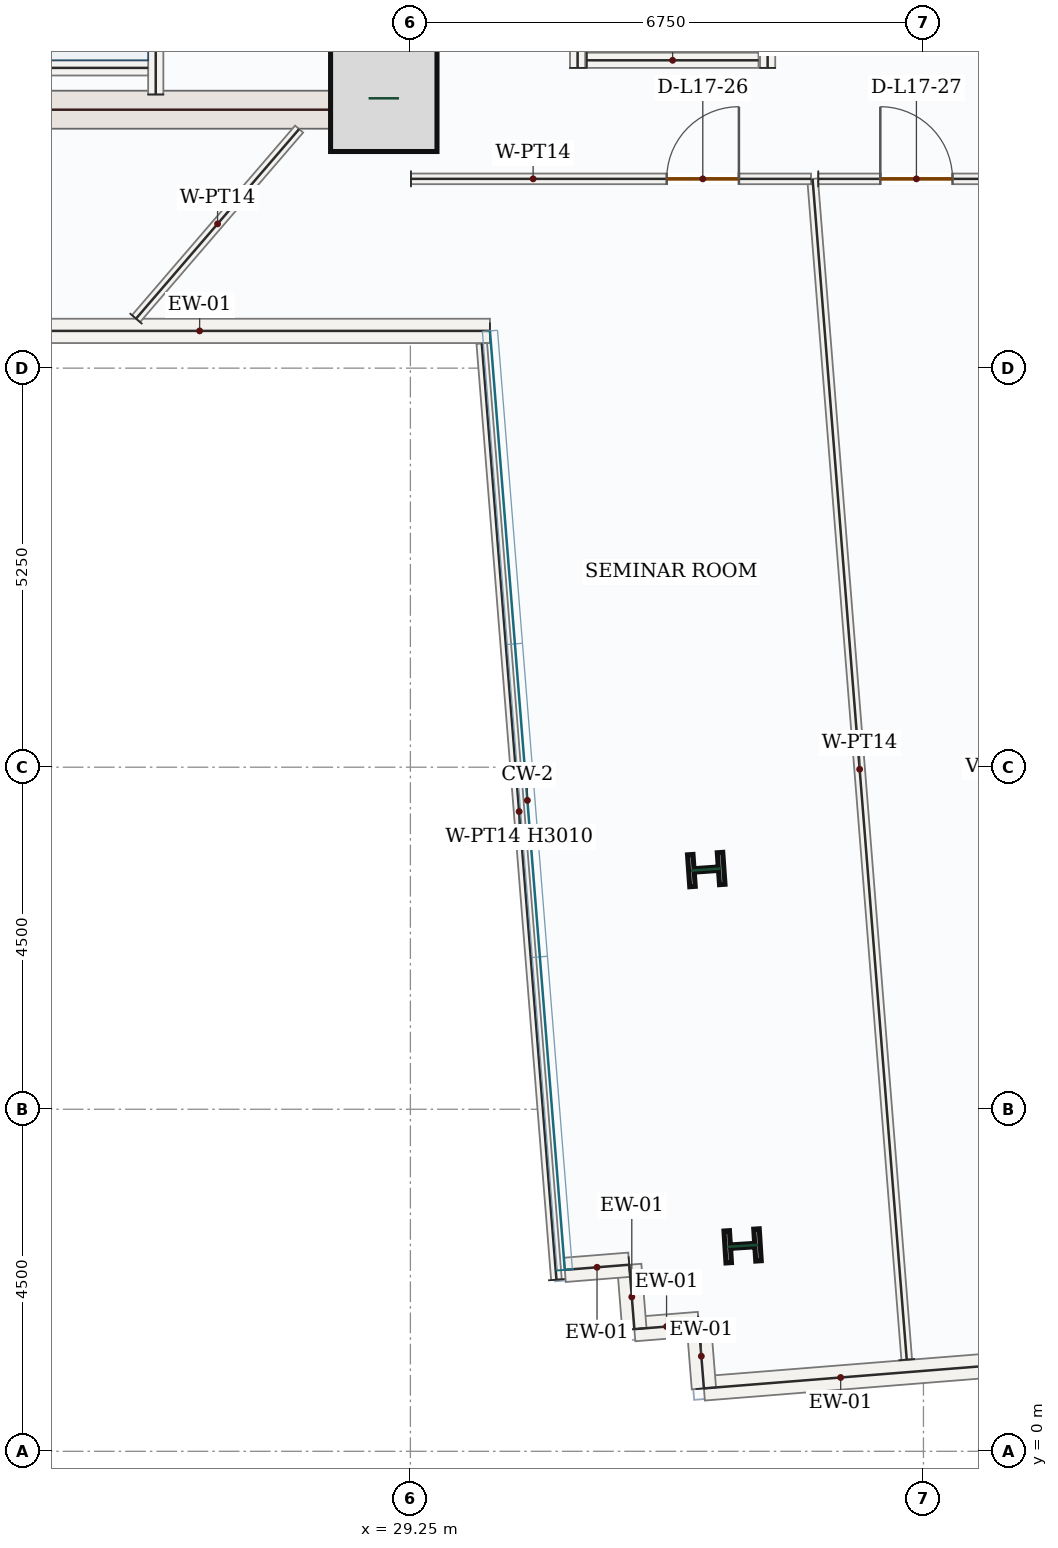
"""IFC4 building model, lengths in metres.
Left out: names, types, materials, properties, quantities, classifications, styles, units other than length and angle.
Written with IfcOpenShell. Run it as: python <this file> out.ifc"""

import sys

from ifc_helpers import new_model, si_unit, direction, frame, frame_2d, origin, origin_2d, place, context, subcontext, project, spatial, rectangle, i_section, extrude, source, transform, mapped, element, fill, save


model = new_model("IFC4")
c1 = context("Model", 3, precision=1e-05, world=origin(), true_north=direction((0.0, 1.0)))
c2 = subcontext(c1, "Body", "Model", "MODEL_VIEW")
j1 = project(units=[si_unit("LENGTHUNIT", "METRE"), si_unit("PLANEANGLEUNIT", "RADIAN")], contexts=[c1])
p1 = place(None, origin())
s1 = spatial("IfcSite", under=j1, at=p1, CompositionType="ELEMENT")
p2 = place(p1, origin())
s2 = spatial("IfcBuilding", under=s1, at=p2, CompositionType="ELEMENT")
p3 = place(p2, frame((0.0, 0.0, 79.5)))
s3 = spatial("IfcBuildingStorey", under=s2, at=p3, CompositionType="ELEMENT", Elevation=79.5)
p4 = place(p3, frame((29.0, 17.4, 0.0), z_axis=(0.0, 0.0, 1.0), x_axis=(0.0, 1.0, 0.0)))
e1 = element("IfcWall", 1, at=p4, inside=s3, PredefinedType="SHEAR", context=c2, shape_type="SweptSolid", body=[
    extrude(rectangle(XDim=8.55, YDim=0.5, at=frame_2d((4.275, 0.0))), origin(), (0.0, 0.0, 1.0), 3.95),
])
p5 = place(p4, frame((6.65, 0.0, 0.0)))
e2 = element("IfcOpeningElement", 2, at=p5, cuts=e1, PredefinedType="OPENING", context=c2, shape_type="SweptSolid", body=[
    extrude(rectangle(XDim=1.1, YDim=2.2, at=frame_2d((0.55, 1.1))), frame((0.0, 0.26, 0.0), z_axis=(0.0, -1.0, 0.0), x_axis=(1.0, 0.0, 0.0)), (0.0, 0.0, 1.0), 0.52),
])
p6 = place(p4, frame((2.15, 0.0, 0.0)))
e3 = element("IfcOpeningElement", 3, at=p6, cuts=e1, PredefinedType="OPENING", context=c2, shape_type="SweptSolid", body=[
    extrude(rectangle(XDim=0.88, YDim=2.1, at=frame_2d((0.44, 1.05))), frame((0.0, 0.26, 0.0), z_axis=(0.0, -1.0, 0.0), x_axis=(1.0, 0.0, 0.0)), (0.0, 0.0, 1.0), 0.52),
])
p7 = place(p4, frame((4.25, 0.0, 0.0)))
e4 = element("IfcOpeningElement", 4, at=p7, cuts=e1, PredefinedType="OPENING", context=c2, shape_type="SweptSolid", body=[
    extrude(rectangle(XDim=0.88, YDim=2.1, at=frame_2d((0.44, 1.05))), frame((0.0, 0.26, 0.0), z_axis=(0.0, -1.0, 0.0), x_axis=(1.0, 0.0, 0.0)), (0.0, 0.0, 1.0), 0.52),
])
m1 = source(origin(), c2, "Body", "SweptSolid", [
    extrude(rectangle(XDim=7.0, YDim=0.5, at=frame_2d((3.5, 0.0))), origin(), (0.0, 0.0, 1.0), 3.95),
])
p8 = place(p3, frame((21.75, 17.65, 0.0), z_axis=(0.0, 0.0, 1.0), x_axis=(1.0, 0.0, 0.0)))
e5 = element("IfcWall", 5, at=p8, inside=s3, PredefinedType="SHEAR", context=c2, shape_type="MappedRepresentation", body=[
    mapped(m1, transform((0.0, 0.0, 0.0), x_axis=(1.0, 0.0, 0.0), y_axis=(0.0, 1.0, 0.0), z_axis=(0.0, 0.0, 1.0), scale=1.0)),
])
m2 = source(origin(), c2, "Body", "SweptSolid", [
    extrude(rectangle(XDim=1.4, YDim=1.4, at=origin_2d()), origin(), (0.0, 0.0, 1.0), 4.2),
])
p9 = place(p3, frame((28.9, 17.8, 0.0), z_axis=(0.0, 0.0, 1.0), x_axis=(1.0, 0.0, 0.0)))
e6 = element("IfcColumn", 6, at=p9, inside=s3, PredefinedType="COLUMN", context=c2, shape_type="MappedRepresentation", body=[
    mapped(m2, transform((0.0, 0.0, 0.0), x_axis=(1.0, 0.0, 0.0), y_axis=(0.0, 1.0, 0.0), z_axis=(0.0, 0.0, 1.0), scale=1.0)),
])
m3 = source(origin(), c2, "Body", "SweptSolid", [
    extrude(i_section(OverallWidth=0.421, OverallDepth=0.465, WebThickness=0.045, FlangeThickness=0.073, FilletRadius=0.018, at=origin_2d()), origin(), (0.0, 0.0, 1.0), 4.2),
])
for number, where, z_axis, x_axis in (
    (7, (33.143, 7.654, 0.0), (0.0, 0.0, 1.0), (-0.07, 0.998, 0.0)),
    (8, (33.621, 2.703, 0.0), (0.0, 0.0, 1.0), (-0.063, 0.998, 0.0)),
):
    element("IfcColumn", number, at=place(p3, frame(where, z_axis=z_axis, x_axis=x_axis)), inside=s3, PredefinedType="COLUMN", context=c2, shape_type="MappedRepresentation", body=[
        mapped(m3, transform((0.0, 0.0, 0.0), x_axis=(1.0, 0.0, 0.0), y_axis=(0.0, 1.0, 0.0), z_axis=(0.0, 0.0, 1.0), scale=1.0)),
    ])
p10 = place(p3, frame((43.0, 1.616, 0.0), z_axis=(0.0, 0.0, 1.0), x_axis=(-0.996833485558, -0.079517306731, 0.0)))
e9 = element("IfcWall", 9, at=p10, inside=s3, PredefinedType="SOLIDWALL", context=c2, shape_type="SweptSolid", body=[
    extrude(rectangle(XDim=9.92, YDim=0.32, at=frame_2d((4.96, 0.0))), origin(), (0.0, 0.0, 1.0), 3.95),
])
p11 = place(p10, frame((3.76, 0.0, 0.85)))
e10 = element("IfcOpeningElement", 10, at=p11, cuts=e9, PredefinedType="OPENING", context=c2, shape_type="SweptSolid", body=[
    extrude(rectangle(XDim=2.4, YDim=1.8, at=frame_2d((1.2, 0.9))), frame((0.0, 0.17, 0.0), z_axis=(0.0, -1.0, 0.0), x_axis=(1.0, 0.0, 0.0)), (0.0, 0.0, 1.0), 0.34),
])
m4 = source(origin(), c2, "Body", "SweptSolid", [
    extrude(rectangle(XDim=0.85, YDim=0.32, at=frame_2d((0.425, 0.0))), origin(), (0.0, 0.0, 1.0), 3.95),
])
p12 = place(p3, frame((33.112, 0.827, 0.0), z_axis=(0.0, 0.0, 1.0), x_axis=(-0.079551174585, 0.996830783344, 0.0)))
e11 = element("IfcWall", 11, at=p12, inside=s3, PredefinedType="SOLIDWALL", context=c2, shape_type="MappedRepresentation", body=[
    mapped(m4, transform((0.0, 0.0, 0.0), x_axis=(1.0, 0.0, 0.0), y_axis=(0.0, 1.0, 0.0), z_axis=(0.0, 0.0, 1.0), scale=1.0)),
])
m5 = source(origin(), c2, "Body", "SweptSolid", [
    extrude(rectangle(XDim=0.85, YDim=0.32, at=frame_2d((0.425, 0.0))), origin(), (0.0, 0.0, 1.0), 3.95),
])
for number, where, z_axis, x_axis in (
    (12, (33.044, 1.675, 0.0), (0.0, 0.0, 1.0), (-0.997, -0.079, 0.0)),
    (13, (32.197, 1.607, 0.0), (0.0, 0.0, 1.0), (-0.08, 0.997, 0.0)),
):
    element("IfcWall", number, at=place(p3, frame(where, z_axis=z_axis, x_axis=x_axis)), inside=s3, PredefinedType="SOLIDWALL", context=c2, shape_type="MappedRepresentation", body=[
        mapped(m5, transform((0.0, 0.0, 0.0), x_axis=(1.0, 0.0, 0.0), y_axis=(0.0, 1.0, 0.0), z_axis=(0.0, 0.0, 1.0), scale=1.0)),
    ])
p13 = place(p3, frame((32.129, 2.455, 0.0), z_axis=(0.0, 0.0, 1.0), x_axis=(-0.996830783344, -0.079551174585, 0.0)))
e14 = element("IfcWall", 14, at=p13, inside=s3, PredefinedType="SOLIDWALL", context=c2, shape_type="MappedRepresentation", body=[
    mapped(m4, transform((0.0, 0.0, 0.0), x_axis=(1.0, 0.0, 0.0), y_axis=(0.0, 1.0, 0.0), z_axis=(0.0, 0.0, 1.0), scale=1.0)),
])
m6 = source(origin(), c2, "Body", "SweptSolid", [
    extrude(rectangle(XDim=7.639, YDim=0.32, at=frame_2d((3.819, 0.0))), origin(), (0.0, 0.0, 1.0), 3.95),
])
p14 = place(p3, frame((30.297, 14.74, 0.0), z_axis=(0.0, 0.0, 1.0), x_axis=(-1.0, 0.0, 0.0)))
e15 = element("IfcWall", 15, at=p14, inside=s3, PredefinedType="SOLIDWALL", context=c2, shape_type="MappedRepresentation", body=[
    mapped(m6, transform((0.0, 0.0, 0.0), x_axis=(1.0, 0.0, 0.0), y_axis=(0.0, 1.0, 0.0), z_axis=(0.0, 0.0, 1.0), scale=1.0)),
])
p15 = place(p3, frame((25.9, 17.85, 0.0), z_axis=(0.0, 0.0, 1.0), x_axis=(0.0, 1.0, 0.0)))
e16 = element("IfcWall", 16, at=p15, inside=s3, PredefinedType="SOLIDWALL", context=c2, shape_type="SweptSolid", body=[
    extrude(rectangle(XDim=8.0, YDim=0.2, at=frame_2d((4.0, 0.0))), origin(), (0.0, 0.0, 1.0), 3.95),
])
p16 = place(p15, frame((6.3, 0.0, 0.0)))
e17 = element("IfcOpeningElement", 17, at=p16, cuts=e16, PredefinedType="OPENING", context=c2, shape_type="SweptSolid", body=[
    extrude(rectangle(XDim=1.05, YDim=2.15, at=frame_2d((0.525, 1.075))), frame((0.0, 0.11, 0.0), z_axis=(0.0, -1.0, 0.0), x_axis=(1.0, 0.0, 0.0)), (0.0, 0.0, 1.0), 0.22),
])
m7 = source(origin(), c2, "Body", "SweptSolid", [
    extrude(rectangle(XDim=3.25, YDim=0.2, at=frame_2d((1.625, 0.0))), origin(), (0.0, 0.0, 1.0), 3.95),
])
p17 = place(p3, frame((22.55, 18.2, 0.0), z_axis=(0.0, 0.0, 1.0), x_axis=(1.0, 0.0, 0.0)))
e18 = element("IfcWall", 18, at=p17, inside=s3, PredefinedType="SOLIDWALL", context=c2, shape_type="MappedRepresentation", body=[
    mapped(m7, transform((0.0, 0.0, 0.0), x_axis=(1.0, 0.0, 0.0), y_axis=(0.0, 1.0, 0.0), z_axis=(0.0, 0.0, 1.0), scale=1.0)),
])
m8 = source(origin(), c2, "Body", "SweptSolid", [
    extrude(rectangle(XDim=2.35, YDim=0.2, at=frame_2d((1.175, 0.0))), origin(), (0.0, 0.0, 1.0), 3.95),
])
for number, where, z_axis, x_axis in (
    (19, (31.45, 18.2, 0.0), (0.0, 0.0, 1.0), (0.0, 1.0, 0.0)),
    (20, (33.95, 18.2, 0.0), (0.0, 0.0, 1.0), (0.0, 1.0, 0.0)),
):
    element("IfcWall", number, at=place(p3, frame(where, z_axis=z_axis, x_axis=x_axis)), inside=s3, PredefinedType="SOLIDWALL", context=c2, shape_type="MappedRepresentation", body=[
        mapped(m8, transform((0.0, 0.0, 0.0), x_axis=(1.0, 0.0, 0.0), y_axis=(0.0, 1.0, 0.0), z_axis=(0.0, 0.0, 1.0), scale=1.0)),
    ])
m9 = source(origin(), c2, "Body", "SweptSolid", [
    extrude(rectangle(XDim=2.26, YDim=0.2, at=frame_2d((1.13, 0.0))), origin(), (0.0, 0.0, 1.0), 3.95),
])
p18 = place(p3, frame((31.57, 18.3, 0.0), z_axis=(0.0, 0.0, 1.0), x_axis=(1.0, 0.0, 0.0)))
e21 = element("IfcWall", 21, at=p18, inside=s3, PredefinedType="SOLIDWALL", context=c2, shape_type="MappedRepresentation", body=[
    mapped(m9, transform((0.0, 0.0, 0.0), x_axis=(1.0, 0.0, 0.0), y_axis=(0.0, 1.0, 0.0), z_axis=(0.0, 0.0, 1.0), scale=1.0)),
])
m10 = source(origin(), c2, "Body", "SweptSolid", [
    extrude(rectangle(XDim=15.583, YDim=0.14, at=frame_2d((7.792, 0.0))), origin(), (0.0, 0.0, 1.0), 3.95),
])
p19 = place(p3, frame((35.78, 1.206, 0.0), z_axis=(0.0, 0.0, 1.0), x_axis=(-0.079507979427, 0.996834229552, 0.0)))
e22 = element("IfcWall", 22, at=p19, inside=s3, PredefinedType="PARTITIONING", context=c2, shape_type="MappedRepresentation", body=[
    mapped(m10, transform((0.0, 0.0, 0.0), x_axis=(1.0, 0.0, 0.0), y_axis=(0.0, 1.0, 0.0), z_axis=(0.0, 0.0, 1.0), scale=1.0)),
])
p20 = place(p3, frame((34.616, 16.74, 0.0), z_axis=(0.0, 0.0, 1.0), x_axis=(1.0, 0.0, 0.0)))
e23 = element("IfcWall", 23, at=p20, inside=s3, PredefinedType="PARTITIONING", context=c2, shape_type="SweptSolid", body=[
    extrude(rectangle(XDim=4.66, YDim=0.14, at=frame_2d((2.33, 0.0))), origin(), (0.0, 0.0, 1.0), 3.95),
])
p21 = place(p20, frame((0.816, 0.0, 0.0)))
e24 = element("IfcOpeningElement", 24, at=p21, cuts=e23, PredefinedType="OPENING", context=c2, shape_type="SweptSolid", body=[
    extrude(rectangle(XDim=0.95, YDim=2.15, at=frame_2d((0.475, 1.075))), frame((0.0, 0.08, 0.0), z_axis=(0.0, -1.0, 0.0), x_axis=(1.0, 0.0, 0.0)), (0.0, 0.0, 1.0), 0.16),
])
p22 = place(p3, frame((29.258, 16.74, 0.0), z_axis=(0.0, 0.0, 1.0), x_axis=(0.999999998924, -4.6384341e-05, 0.0)))
e25 = element("IfcWall", 25, at=p22, inside=s3, PredefinedType="PARTITIONING", context=c2, shape_type="SweptSolid", body=[
    extrude(rectangle(XDim=5.263, YDim=0.14, at=frame_2d((2.632, 0.0))), origin(), (0.0, 0.0, 1.0), 3.95),
])
p23 = place(p22, frame((3.365, 0.0, 0.0)))
e26 = element("IfcOpeningElement", 26, at=p23, cuts=e25, PredefinedType="OPENING", context=c2, shape_type="SweptSolid", body=[
    extrude(rectangle(XDim=0.95, YDim=2.15, at=frame_2d((0.475, 1.075))), frame((0.0, 0.08, 0.0), z_axis=(0.0, -1.0, 0.0), x_axis=(1.0, 0.0, 0.0)), (0.0, 0.0, 1.0), 0.16),
])
m11 = source(origin(), c2, "Body", "SweptSolid", [
    extrude(rectangle(XDim=12.356, YDim=0.14, at=frame_2d((6.178, 0.0))), origin(), (0.0, 0.0, 1.0), 3.01),
])
p24 = place(p3, frame((31.172, 2.258, 0.0), z_axis=(0.0, 0.0, 1.0), x_axis=(-0.079527689156, 0.996832657299, 0.0)))
e27 = element("IfcWall", 27, at=p24, inside=s3, PredefinedType="PARTITIONING", context=c2, shape_type="MappedRepresentation", body=[
    mapped(m11, transform((0.0, 0.0, 0.0), x_axis=(1.0, 0.0, 0.0), y_axis=(0.0, 1.0, 0.0), z_axis=(0.0, 0.0, 1.0), scale=1.0)),
])
m12 = source(origin(), c2, "Body", "SweptSolid", [
    extrude(rectangle(XDim=3.29, YDim=0.14, at=frame_2d((1.645, 0.0))), origin(), (0.0, 0.0, 1.0), 3.95),
])
p25 = place(p3, frame((25.64, 14.901, 0.0), z_axis=(0.0, 0.0, 1.0), x_axis=(0.652214149627, 0.758034763732, 0.0)))
e28 = element("IfcWall", 28, at=p25, inside=s3, PredefinedType="PARTITIONING", context=c2, shape_type="MappedRepresentation", body=[
    mapped(m12, transform((0.0, 0.0, 0.0), x_axis=(1.0, 0.0, 0.0), y_axis=(0.0, 1.0, 0.0), z_axis=(0.0, 0.0, 1.0), scale=1.0)),
])
m13 = source(origin(), c2, "Body", "SweptSolid", [
    extrude(rectangle(XDim=0.95, YDim=2.15, at=frame_2d((0.475, 1.075))), frame((0.0, 0.025, 0.0), z_axis=(0.0, -1.0, 0.0), x_axis=(1.0, 0.0, 0.0)), (0.0, 0.0, 1.0), 0.05),
])
p26 = place(p23, origin())
e29 = element("IfcDoor", 29, at=p26, inside=s3, OperationType="SINGLE_SWING_RIGHT", PredefinedType="DOOR", context=c2, shape_type="MappedRepresentation", body=[
    mapped(m13, transform((0.0, 0.0, 0.0), x_axis=(1.0, 0.0, 0.0), y_axis=(0.0, 1.0, 0.0), z_axis=(0.0, 0.0, 1.0), scale=1.0)),
])
fill(e26, e29)
p27 = place(p21, origin())
e30 = element("IfcDoor", 30, at=p27, inside=s3, OperationType="SINGLE_SWING_LEFT", PredefinedType="DOOR", context=c2, shape_type="MappedRepresentation", body=[
    mapped(m13, transform((0.0, 0.0, 0.0), x_axis=(1.0, 0.0, 0.0), y_axis=(0.0, 1.0, 0.0), z_axis=(0.0, 0.0, 1.0), scale=1.0)),
])
fill(e24, e30)
save(model, sys.argv[1])
